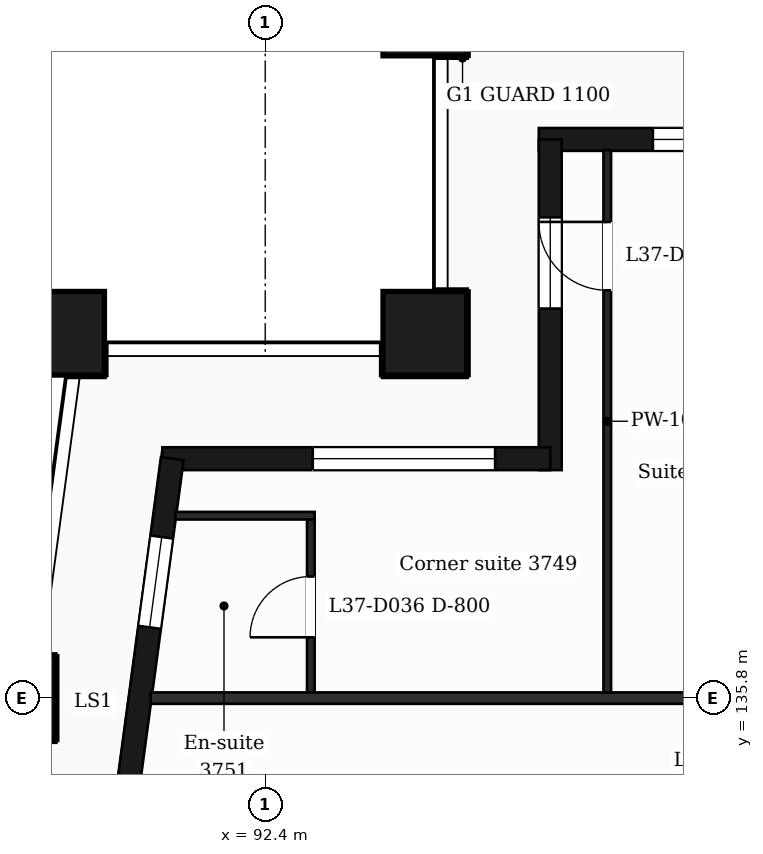
"""IFC4 building model, lengths in metres.
Left out: names, types, materials, properties, quantities, classifications, styles, units other than length and angle.
Written with IfcOpenShell. Run it as: python <this file> out.ifc"""

import sys

from ifc_helpers import new_model, si_unit, direction, frame, frame_2d, origin, origin_2d, place, context, subcontext, project, spatial, rectangle, extrude, element, fill, save


model = new_model("IFC4")
c1 = context("Model", 3, precision=1e-05, world=origin(), true_north=direction((0.0, 1.0)))
c2 = subcontext(c1, "Body", "Model", "MODEL_VIEW")
j1 = project(units=[si_unit("LENGTHUNIT", "METRE"), si_unit("PLANEANGLEUNIT", "RADIAN")], contexts=[c1])
p1 = place(None, origin())
s1 = spatial("IfcSite", under=j1, at=p1, CompositionType="ELEMENT")
p2 = place(p1, origin())
s2 = spatial("IfcBuilding", under=s1, at=p2, CompositionType="ELEMENT")
p3 = place(p2, frame((0.0, 0.0, 158.9)))
s3 = spatial("IfcBuildingStorey", under=s2, at=p3, CompositionType="ELEMENT", Elevation=158.9)
for number, where, z_axis, x_axis in (
    (1, (94.5, 140.6, 0.0), (0.0, 0.0, 1.0), (1.0, 0.0, 0.0)),
    (2, (89.735, 140.6, 0.0), (0.0, 0.0, 1.0), (1.0, 0.0, 0.0)),
    (3, (89.088, 135.8, 0.0), (0.0, 0.0, 1.0), (1.0, 0.0, 0.0)),
    (4, (94.5, 144.8, 0.0), (0.0, 0.0, 1.0), (1.0, 0.0, 0.0)),
):
    element("IfcColumn", number, at=place(p3, frame(where, z_axis=z_axis, x_axis=x_axis)), inside=s3, PredefinedType="COLUMN", context=c2, shape_type="SweptSolid", body=[
        extrude(rectangle(XDim=1.1, YDim=1.1, at=origin_2d()), origin(), (0.0, 0.0, 1.0), 3.7),
    ])
p4 = place(p3, frame((112.5, 143.15, 0.0), z_axis=(0.0, 0.0, 1.0), x_axis=(-1.0, 0.0, 0.0)))
e5 = element("IfcWall", 5, at=p4, inside=s3, PredefinedType="SOLIDWALL", context=c2, shape_type="SweptSolid", body=[
    extrude(rectangle(XDim=16.5, YDim=0.3, at=frame_2d((8.25, 0.0))), origin(), (0.0, 0.0, 1.0), 3.38),
])
p5 = place(p4, frame((0.5, 0.0, 0.9)))
e6 = element("IfcOpeningElement", 6, at=p5, cuts=e5, PredefinedType="OPENING", context=c2, shape_type="SweptSolid", body=[
    extrude(rectangle(XDim=2.4, YDim=2.1, at=frame_2d((1.2, 1.05))), frame((0.0, 0.16, 0.0), z_axis=(0.0, -1.0, 0.0), x_axis=(1.0, 0.0, 0.0)), (0.0, 0.0, 1.0), 0.32),
])
p6 = place(p4, frame((4.2, 0.0, 0.9)))
e7 = element("IfcOpeningElement", 7, at=p6, cuts=e5, PredefinedType="OPENING", context=c2, shape_type="SweptSolid", body=[
    extrude(rectangle(XDim=2.4, YDim=2.1, at=frame_2d((1.2, 1.05))), frame((0.0, 0.16, 0.0), z_axis=(0.0, -1.0, 0.0), x_axis=(1.0, 0.0, 0.0)), (0.0, 0.0, 1.0), 0.32),
])
p7 = place(p4, frame((9.0, 0.0, 0.0)))
e8 = element("IfcOpeningElement", 8, at=p7, cuts=e5, PredefinedType="OPENING", context=c2, shape_type="SweptSolid", body=[
    extrude(rectangle(XDim=1.2, YDim=2.4, at=frame_2d((0.6, 1.2))), frame((0.0, 0.16, 0.0), z_axis=(0.0, -1.0, 0.0), x_axis=(1.0, 0.0, 0.0)), (0.0, 0.0, 1.0), 0.32),
])
p8 = place(p4, frame((12.6, 0.0, 0.9)))
e9 = element("IfcOpeningElement", 9, at=p8, cuts=e5, PredefinedType="OPENING", context=c2, shape_type="SweptSolid", body=[
    extrude(rectangle(XDim=2.4, YDim=2.1, at=frame_2d((1.2, 1.05))), frame((0.0, 0.16, 0.0), z_axis=(0.0, -1.0, 0.0), x_axis=(1.0, 0.0, 0.0)), (0.0, 0.0, 1.0), 0.32),
])
p9 = place(p3, frame((96.15, 143.15, 0.0), z_axis=(0.0, 0.0, 1.0), x_axis=(0.0, -1.0, 0.0)))
e10 = element("IfcWall", 10, at=p9, inside=s3, PredefinedType="SOLIDWALL", context=c2, shape_type="SweptSolid", body=[
    extrude(rectangle(XDim=4.35, YDim=0.3, at=frame_2d((2.175, 0.0))), origin(), (0.0, 0.0, 1.0), 3.38),
])
p10 = place(p9, frame((1.025, 0.0, 0.9)))
e11 = element("IfcOpeningElement", 11, at=p10, cuts=e10, PredefinedType="OPENING", context=c2, shape_type="SweptSolid", body=[
    extrude(rectangle(XDim=1.2, YDim=2.1, at=frame_2d((0.6, 1.05))), frame((0.0, 0.16, 0.0), z_axis=(0.0, -1.0, 0.0), x_axis=(1.0, 0.0, 0.0)), (0.0, 0.0, 1.0), 0.32),
])
p11 = place(p3, frame((96.15, 138.95, 0.0), z_axis=(0.0, 0.0, 1.0), x_axis=(-1.0, 0.0, 0.0)))
e12 = element("IfcWall", 12, at=p11, inside=s3, PredefinedType="SOLIDWALL", context=c2, shape_type="SweptSolid", body=[
    extrude(rectangle(XDim=5.104, YDim=0.3, at=frame_2d((2.552, 0.0))), origin(), (0.0, 0.0, 1.0), 3.38),
])
p12 = place(p11, frame((0.725, 0.0, 0.9)))
e13 = element("IfcOpeningElement", 13, at=p12, cuts=e12, PredefinedType="OPENING", context=c2, shape_type="SweptSolid", body=[
    extrude(rectangle(XDim=2.4, YDim=2.1, at=frame_2d((1.2, 1.05))), frame((0.0, 0.16, 0.0), z_axis=(0.0, -1.0, 0.0), x_axis=(1.0, 0.0, 0.0)), (0.0, 0.0, 1.0), 0.32),
])
p13 = place(p3, frame((91.177, 138.95, 0.0), z_axis=(0.0, 0.0, 1.0), x_axis=(-0.133426664613, -0.991058689065, 0.0)))
e14 = element("IfcWall", 14, at=p13, inside=s3, PredefinedType="SOLIDWALL", context=c2, shape_type="SweptSolid", body=[
    extrude(rectangle(XDim=6.609, YDim=0.3, at=frame_2d((3.305, 0.0))), origin(), (0.0, 0.0, 1.0), 3.38),
])
p14 = place(p13, frame((1.039, 0.0, 0.9)))
e15 = element("IfcOpeningElement", 15, at=p14, cuts=e14, PredefinedType="OPENING", context=c2, shape_type="SweptSolid", body=[
    extrude(rectangle(XDim=1.2, YDim=2.1, at=frame_2d((0.6, 1.05))), frame((0.0, 0.16, 0.0), z_axis=(0.0, -1.0, 0.0), x_axis=(1.0, 0.0, 0.0)), (0.0, 0.0, 1.0), 0.32),
])
p15 = place(p13, frame((4.294, 0.0, 0.0)))
e16 = element("IfcOpeningElement", 16, at=p15, cuts=e14, PredefinedType="OPENING", context=c2, shape_type="SweptSolid", body=[
    extrude(rectangle(XDim=1.2, YDim=2.4, at=frame_2d((0.6, 1.2))), frame((0.0, 0.16, 0.0), z_axis=(0.0, -1.0, 0.0), x_axis=(1.0, 0.0, 0.0)), (0.0, 0.0, 1.0), 0.32),
])
p16 = place(p3, frame((90.895, 135.8, 0.0), z_axis=(0.0, 0.0, 1.0), x_axis=(1.0, 0.0, 0.0)))
e17 = element("IfcWall", 17, at=p16, inside=s3, PredefinedType="PARTITIONING", context=c2, shape_type="SweptSolid", body=[
    extrude(rectangle(XDim=45.011, YDim=0.15, at=frame_2d((22.505, 0.0))), origin(), (0.0, 0.0, 1.0), 3.38),
])
p17 = place(p16, frame((8.005, 0.0, 0.0)))
e18 = element("IfcOpeningElement", 18, at=p17, cuts=e17, PredefinedType="OPENING", context=c2, shape_type="SweptSolid", body=[
    extrude(rectangle(XDim=1.0, YDim=2.1, at=frame_2d((0.5, 1.05))), frame((0.0, 0.085, 0.0), z_axis=(0.0, -1.0, 0.0), x_axis=(1.0, 0.0, 0.0)), (0.0, 0.0, 1.0), 0.17),
])
p18 = place(p16, frame((10.67, 0.0, 0.0)))
e19 = element("IfcOpeningElement", 19, at=p18, cuts=e17, PredefinedType="OPENING", context=c2, shape_type="SweptSolid", body=[
    extrude(rectangle(XDim=0.95, YDim=2.1, at=frame_2d((0.475, 1.05))), frame((0.0, 0.085, 0.0), z_axis=(0.0, -1.0, 0.0), x_axis=(1.0, 0.0, 0.0)), (0.0, 0.0, 1.0), 0.17),
])
p19 = place(p16, frame((16.59, 0.0, 0.0)))
e20 = element("IfcOpeningElement", 20, at=p19, cuts=e17, PredefinedType="OPENING", context=c2, shape_type="SweptSolid", body=[
    extrude(rectangle(XDim=0.95, YDim=2.1, at=frame_2d((0.475, 1.05))), frame((0.0, 0.085, 0.0), z_axis=(0.0, -1.0, 0.0), x_axis=(1.0, 0.0, 0.0)), (0.0, 0.0, 1.0), 0.17),
])
p20 = place(p16, frame((20.98, 0.0, 0.0)))
e21 = element("IfcOpeningElement", 21, at=p20, cuts=e17, PredefinedType="OPENING", context=c2, shape_type="SweptSolid", body=[
    extrude(rectangle(XDim=0.95, YDim=2.1, at=frame_2d((0.475, 1.05))), frame((0.0, 0.085, 0.0), z_axis=(0.0, -1.0, 0.0), x_axis=(1.0, 0.0, 0.0)), (0.0, 0.0, 1.0), 0.17),
])
p21 = place(p16, frame((29.335, 0.0, 0.0)))
e22 = element("IfcOpeningElement", 22, at=p21, cuts=e17, PredefinedType="OPENING", context=c2, shape_type="SweptSolid", body=[
    extrude(rectangle(XDim=0.95, YDim=2.1, at=frame_2d((0.475, 1.05))), frame((0.0, 0.085, 0.0), z_axis=(0.0, -1.0, 0.0), x_axis=(1.0, 0.0, 0.0)), (0.0, 0.0, 1.0), 0.17),
])
p22 = place(p16, frame((31.156, 0.0, 0.0)))
e23 = element("IfcOpeningElement", 23, at=p22, cuts=e17, PredefinedType="OPENING", context=c2, shape_type="SweptSolid", body=[
    extrude(rectangle(XDim=1.0, YDim=2.1, at=frame_2d((0.5, 1.05))), frame((0.0, 0.085, 0.0), z_axis=(0.0, -1.0, 0.0), x_axis=(1.0, 0.0, 0.0)), (0.0, 0.0, 1.0), 0.17),
])
p23 = place(p16, frame((36.775, 0.0, 0.0)))
e24 = element("IfcOpeningElement", 24, at=p23, cuts=e17, PredefinedType="OPENING", context=c2, shape_type="SweptSolid", body=[
    extrude(rectangle(XDim=1.0, YDim=2.1, at=frame_2d((0.5, 1.05))), frame((0.0, 0.085, 0.0), z_axis=(0.0, -1.0, 0.0), x_axis=(1.0, 0.0, 0.0)), (0.0, 0.0, 1.0), 0.17),
])
p24 = place(p3, frame((91.218, 138.2, 0.0), z_axis=(0.0, 0.0, 1.0), x_axis=(1.0, 0.0, 0.0)))
e25 = element("IfcWall", 25, at=p24, inside=s3, PredefinedType="PARTITIONING", context=c2, shape_type="SweptSolid", body=[
    extrude(rectangle(XDim=1.832, YDim=0.1, at=frame_2d((0.916, 0.0))), origin(), (0.0, 0.0, 1.0), 3.38),
])
p25 = place(p3, frame((93.0, 135.875, 0.0), z_axis=(0.0, 0.0, 1.0), x_axis=(0.0, 1.0, 0.0)))
e26 = element("IfcWall", 26, at=p25, inside=s3, PredefinedType="PARTITIONING", context=c2, shape_type="SweptSolid", body=[
    extrude(rectangle(XDim=2.275, YDim=0.1, at=frame_2d((1.137, 0.0))), origin(), (0.0, 0.0, 1.0), 3.38),
])
p26 = place(p25, frame((0.725, 0.0, 0.0)))
e27 = element("IfcOpeningElement", 27, at=p26, cuts=e26, PredefinedType="OPENING", context=c2, shape_type="SweptSolid", body=[
    extrude(rectangle(XDim=0.8, YDim=2.1, at=frame_2d((0.4, 1.05))), frame((0.0, 0.06, 0.0), z_axis=(0.0, -1.0, 0.0), x_axis=(1.0, 0.0, 0.0)), (0.0, 0.0, 1.0), 0.12),
])
p27 = place(p3, frame((96.9, 135.875, 0.0), z_axis=(0.0, 0.0, 1.0), x_axis=(0.0, 1.0, 0.0)))
e28 = element("IfcWall", 28, at=p27, inside=s3, PredefinedType="PARTITIONING", context=c2, shape_type="SweptSolid", body=[
    extrude(rectangle(XDim=7.135, YDim=0.1, at=frame_2d((3.567, 0.0))), origin(), (0.0, 0.0, 1.0), 3.38),
])
p28 = place(p27, frame((5.29, 0.0, 0.0)))
e29 = element("IfcOpeningElement", 29, at=p28, cuts=e28, PredefinedType="OPENING", context=c2, shape_type="SweptSolid", body=[
    extrude(rectangle(XDim=0.9, YDim=2.1, at=frame_2d((0.45, 1.05))), frame((0.0, 0.06, 0.0), z_axis=(0.0, -1.0, 0.0), x_axis=(1.0, 0.0, 0.0)), (0.0, 0.0, 1.0), 0.12),
])
p29 = place(p8, origin())
e30 = element("IfcWindow", 30, at=p29, inside=s3, PartitioningType="SINGLE_PANEL", PredefinedType="WINDOW", context=c2, shape_type="SweptSolid", body=[
    extrude(rectangle(XDim=2.4, YDim=2.1, at=frame_2d((1.2, 1.05))), frame((0.0, 0.03, 0.0), z_axis=(0.0, -1.0, 0.0), x_axis=(1.0, 0.0, 0.0)), (0.0, 0.0, 1.0), 0.06),
])
fill(e9, e30)
p30 = place(p10, origin())
e31 = element("IfcWindow", 31, at=p30, inside=s3, PartitioningType="SINGLE_PANEL", PredefinedType="WINDOW", context=c2, shape_type="SweptSolid", body=[
    extrude(rectangle(XDim=1.2, YDim=2.1, at=frame_2d((0.6, 1.05))), frame((0.0, 0.03, 0.0), z_axis=(0.0, -1.0, 0.0), x_axis=(1.0, 0.0, 0.0)), (0.0, 0.0, 1.0), 0.06),
])
fill(e11, e31)
p31 = place(p12, origin())
e32 = element("IfcWindow", 32, at=p31, inside=s3, PartitioningType="SINGLE_PANEL", PredefinedType="WINDOW", context=c2, shape_type="SweptSolid", body=[
    extrude(rectangle(XDim=2.4, YDim=2.1, at=frame_2d((1.2, 1.05))), frame((0.0, 0.03, 0.0), z_axis=(0.0, -1.0, 0.0), x_axis=(1.0, 0.0, 0.0)), (0.0, 0.0, 1.0), 0.06),
])
fill(e13, e32)
p32 = place(p14, origin())
e33 = element("IfcWindow", 33, at=p32, inside=s3, PartitioningType="SINGLE_PANEL", PredefinedType="WINDOW", context=c2, shape_type="SweptSolid", body=[
    extrude(rectangle(XDim=1.2, YDim=2.1, at=frame_2d((0.6, 1.05))), frame((0.0, 0.03, 0.0), z_axis=(0.0, -1.0, 0.0), x_axis=(1.0, 0.0, 0.0)), (0.0, 0.0, 1.0), 0.06),
])
fill(e15, e33)
p33 = place(p28, origin())
e34 = element("IfcDoor", 34, at=p33, inside=s3, OperationType="SINGLE_SWING_RIGHT", PredefinedType="DOOR", context=c2, shape_type="SweptSolid", body=[
    extrude(rectangle(XDim=0.9, YDim=2.1, at=frame_2d((0.45, 1.05))), frame((0.0, 0.025, 0.0), z_axis=(0.0, -1.0, 0.0), x_axis=(1.0, 0.0, 0.0)), (0.0, 0.0, 1.0), 0.05),
])
fill(e29, e34)
p34 = place(p26, origin())
e35 = element("IfcDoor", 35, at=p34, inside=s3, OperationType="SINGLE_SWING_LEFT", PredefinedType="DOOR", context=c2, shape_type="SweptSolid", body=[
    extrude(rectangle(XDim=0.8, YDim=2.1, at=frame_2d((0.4, 1.05))), frame((0.0, 0.025, 0.0), z_axis=(0.0, -1.0, 0.0), x_axis=(1.0, 0.0, 0.0)), (0.0, 0.0, 1.0), 0.05),
])
fill(e27, e35)
save(model, sys.argv[1])
